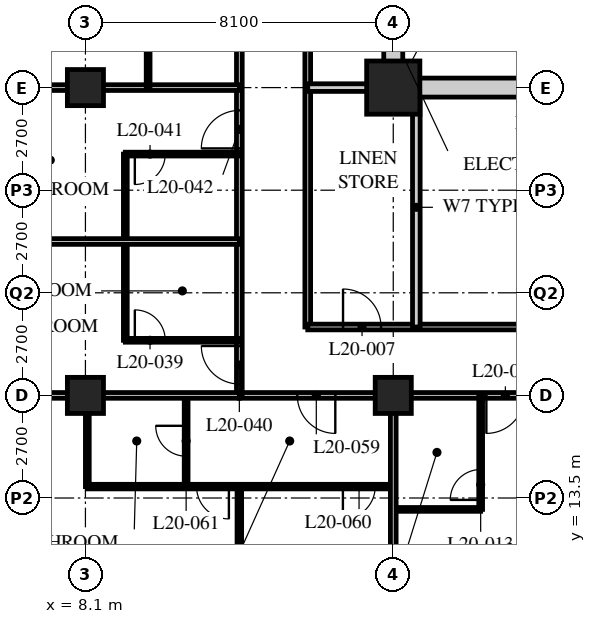
"""IFC4 building model, lengths in metres.
Left out: names, types, materials, properties, quantities, classifications, styles, units other than length and angle.
Written with IfcOpenShell. Run it as: python <this file> out.ifc"""

import sys

from ifc_helpers import new_model, si_unit, direction, frame, frame_2d, origin, origin_2d, place, context, subcontext, project, spatial, rectangle, hollow_rectangle, extrude, element, fill, save


model = new_model("IFC4")
c1 = context("Model", 3, precision=1e-05, world=origin(), true_north=direction((0.0, 1.0)))
c2 = subcontext(c1, "Body", "Model", "MODEL_VIEW")
j1 = project(units=[si_unit("LENGTHUNIT", "METRE"), si_unit("PLANEANGLEUNIT", "RADIAN")], contexts=[c1])
p1 = place(None, origin())
s1 = spatial("IfcSite", under=j1, at=p1, CompositionType="ELEMENT")
p2 = place(p1, origin())
s2 = spatial("IfcBuilding", under=s1, at=p2, CompositionType="ELEMENT")
p3 = place(p2, frame((0.0, 0.0, 80.6)))
s3 = spatial("IfcBuildingStorey", under=s2, at=p3, CompositionType="ELEMENT", Elevation=80.6)
for number, where, z_axis, x_axis in (
    (1, (8.1, 16.2, 0.0), (0.0, 0.0, 1.0), (1.0, 0.0, 0.0)),
    (2, (8.1, 24.3, 0.0), (0.0, 0.0, 1.0), (1.0, 0.0, 0.0)),
    (3, (16.2, 16.2, 0.0), (0.0, 0.0, 1.0), (1.0, 0.0, 0.0)),
):
    element("IfcColumn", number, at=place(p3, frame(where, z_axis=z_axis, x_axis=x_axis)), inside=s3, PredefinedType="COLUMN", context=c2, shape_type="SweptSolid", body=[
        extrude(hollow_rectangle(XDim=0.95, YDim=0.95, WallThickness=0.095, at=origin_2d()), origin(), (0.0, 0.0, 1.0), 3.4),
    ])
p4 = place(p3, frame((16.2, 24.3, 0.0), z_axis=(0.0, 0.0, 1.0), x_axis=(1.0, 0.0, 0.0)))
e4 = element("IfcColumn", 4, at=p4, inside=s3, PredefinedType="COLUMN", context=c2, shape_type="SweptSolid", body=[
    extrude(hollow_rectangle(XDim=1.4, YDim=1.4, WallThickness=0.12, at=origin_2d()), origin(), (0.0, 0.0, 1.0), 3.4),
])
p5 = place(p3, frame((12.15, 16.2, 0.0), z_axis=(0.0, 0.0, 1.0), x_axis=(1.0, 0.0, 0.0)))
e5 = element("IfcWall", 5, at=p5, inside=s3, PredefinedType="PARTITIONING", context=c2, shape_type="SweptSolid", body=[
    extrude(rectangle(XDim=36.45, YDim=0.15, at=frame_2d((18.225, 0.0))), origin(), (0.0, 0.0, 1.0), 2.428),
])
p6 = place(p5, frame((6.5, 0.0, 0.0)))
e6 = element("IfcOpeningElement", 6, at=p6, cuts=e5, PredefinedType="OPENING", context=c2, shape_type="SweptSolid", body=[
    extrude(rectangle(XDim=1.0, YDim=2.1, at=frame_2d((0.5, 1.05))), frame((0.0, 0.085, 0.0), z_axis=(0.0, -1.0, 0.0), x_axis=(1.0, 0.0, 0.0)), (0.0, 0.0, 1.0), 0.17),
])
p7 = place(p5, frame((8.4, 0.0, 0.0)))
e7 = element("IfcOpeningElement", 7, at=p7, cuts=e5, PredefinedType="OPENING", context=c2, shape_type="SweptSolid", body=[
    extrude(rectangle(XDim=1.0, YDim=2.1, at=frame_2d((0.5, 1.05))), frame((0.0, 0.085, 0.0), z_axis=(0.0, -1.0, 0.0), x_axis=(1.0, 0.0, 0.0)), (0.0, 0.0, 1.0), 0.17),
])
p8 = place(p5, frame((14.9, 0.0, 0.0)))
e8 = element("IfcOpeningElement", 8, at=p8, cuts=e5, PredefinedType="OPENING", context=c2, shape_type="SweptSolid", body=[
    extrude(rectangle(XDim=1.0, YDim=2.1, at=frame_2d((0.5, 1.05))), frame((0.0, 0.085, 0.0), z_axis=(0.0, -1.0, 0.0), x_axis=(1.0, 0.0, 0.0)), (0.0, 0.0, 1.0), 0.17),
])
p9 = place(p5, frame((16.5, 0.0, 0.0)))
e9 = element("IfcOpeningElement", 9, at=p9, cuts=e5, PredefinedType="OPENING", context=c2, shape_type="SweptSolid", body=[
    extrude(rectangle(XDim=1.0, YDim=2.1, at=frame_2d((0.5, 1.05))), frame((0.0, 0.085, 0.0), z_axis=(0.0, -1.0, 0.0), x_axis=(1.0, 0.0, 0.0)), (0.0, 0.0, 1.0), 0.17),
])
p10 = place(p5, frame((22.7, 0.0, 0.0)))
e10 = element("IfcOpeningElement", 10, at=p10, cuts=e5, PredefinedType="OPENING", context=c2, shape_type="SweptSolid", body=[
    extrude(rectangle(XDim=1.0, YDim=2.1, at=frame_2d((0.5, 1.05))), frame((0.0, 0.085, 0.0), z_axis=(0.0, -1.0, 0.0), x_axis=(1.0, 0.0, 0.0)), (0.0, 0.0, 1.0), 0.17),
])
p11 = place(p5, frame((24.9, 0.0, 0.0)))
e11 = element("IfcOpeningElement", 11, at=p11, cuts=e5, PredefinedType="OPENING", context=c2, shape_type="SweptSolid", body=[
    extrude(rectangle(XDim=1.0, YDim=2.1, at=frame_2d((0.5, 1.05))), frame((0.0, 0.085, 0.0), z_axis=(0.0, -1.0, 0.0), x_axis=(1.0, 0.0, 0.0)), (0.0, 0.0, 1.0), 0.17),
])
p12 = place(p5, frame((30.8, 0.0, 0.0)))
e12 = element("IfcOpeningElement", 12, at=p12, cuts=e5, PredefinedType="OPENING", context=c2, shape_type="SweptSolid", body=[
    extrude(rectangle(XDim=1.0, YDim=2.1, at=frame_2d((0.5, 1.05))), frame((0.0, 0.085, 0.0), z_axis=(0.0, -1.0, 0.0), x_axis=(1.0, 0.0, 0.0)), (0.0, 0.0, 1.0), 0.17),
])
p13 = place(p5, frame((1.525, 0.0, 0.0)))
e13 = element("IfcOpeningElement", 13, at=p13, cuts=e5, PredefinedType="OPENING", context=c2, shape_type="SweptSolid", body=[
    extrude(rectangle(XDim=1.0, YDim=2.1, at=frame_2d((0.5, 1.05))), frame((0.0, 0.085, 0.0), z_axis=(0.0, -1.0, 0.0), x_axis=(1.0, 0.0, 0.0)), (0.0, 0.0, 1.0), 0.17),
])
p14 = place(p5, frame((33.925, 0.0, 0.0)))
e14 = element("IfcOpeningElement", 14, at=p14, cuts=e5, PredefinedType="OPENING", context=c2, shape_type="SweptSolid", body=[
    extrude(rectangle(XDim=1.0, YDim=2.1, at=frame_2d((0.5, 1.05))), frame((0.0, 0.085, 0.0), z_axis=(0.0, -1.0, 0.0), x_axis=(1.0, 0.0, 0.0)), (0.0, 0.0, 1.0), 0.17),
])
p15 = place(p3, frame((12.15, 16.2, 0.0), z_axis=(0.0, 0.0, 1.0), x_axis=(0.0, 1.0, 0.0)))
e15 = element("IfcWall", 15, at=p15, inside=s3, PredefinedType="PARTITIONING", context=c2, shape_type="SweptSolid", body=[
    extrude(rectangle(XDim=26.1, YDim=0.15, at=frame_2d((13.05, 0.0))), origin(), (0.0, 0.0, 1.0), 3.19),
])
p16 = place(p15, frame((0.3, 0.0, 0.0)))
e16 = element("IfcOpeningElement", 16, at=p16, cuts=e15, PredefinedType="OPENING", context=c2, shape_type="SweptSolid", body=[
    extrude(rectangle(XDim=1.0, YDim=2.1, at=frame_2d((0.5, 1.05))), frame((0.0, 0.085, 0.0), z_axis=(0.0, -1.0, 0.0), x_axis=(1.0, 0.0, 0.0)), (0.0, 0.0, 1.0), 0.17),
])
p17 = place(p15, frame((6.5, 0.0, 0.0)))
e17 = element("IfcOpeningElement", 17, at=p17, cuts=e15, PredefinedType="OPENING", context=c2, shape_type="SweptSolid", body=[
    extrude(rectangle(XDim=1.0, YDim=2.1, at=frame_2d((0.5, 1.05))), frame((0.0, 0.085, 0.0), z_axis=(0.0, -1.0, 0.0), x_axis=(1.0, 0.0, 0.0)), (0.0, 0.0, 1.0), 0.17),
])
p18 = place(p15, frame((13.55, 0.0, 0.0)))
e18 = element("IfcOpeningElement", 18, at=p18, cuts=e15, PredefinedType="OPENING", context=c2, shape_type="SweptSolid", body=[
    extrude(rectangle(XDim=1.0, YDim=2.1, at=frame_2d((0.5, 1.05))), frame((0.0, 0.085, 0.0), z_axis=(0.0, -1.0, 0.0), x_axis=(1.0, 0.0, 0.0)), (0.0, 0.0, 1.0), 0.17),
])
p19 = place(p15, frame((21.65, 0.0, 0.0)))
e19 = element("IfcOpeningElement", 19, at=p19, cuts=e15, PredefinedType="OPENING", context=c2, shape_type="SweptSolid", body=[
    extrude(rectangle(XDim=1.0, YDim=2.1, at=frame_2d((0.5, 1.05))), frame((0.0, 0.085, 0.0), z_axis=(0.0, -1.0, 0.0), x_axis=(1.0, 0.0, 0.0)), (0.0, 0.0, 1.0), 0.17),
])
p20 = place(p3, frame((13.95, 40.5, 0.0), z_axis=(0.0, 0.0, 1.0), x_axis=(0.0, -1.0, 0.0)))
e20 = element("IfcWall", 20, at=p20, inside=s3, PredefinedType="PARTITIONING", context=c2, shape_type="SweptSolid", body=[
    extrude(rectangle(XDim=22.5, YDim=0.15, at=frame_2d((11.25, 0.0))), origin(), (0.0, 0.0, 1.0), 3.19),
])
p21 = place(p20, frame((11.65, 0.0, 0.0)))
e21 = element("IfcOpeningElement", 21, at=p21, cuts=e20, PredefinedType="OPENING", context=c2, shape_type="SweptSolid", body=[
    extrude(rectangle(XDim=1.0, YDim=2.1, at=frame_2d((0.5, 1.05))), frame((0.0, 0.085, 0.0), z_axis=(0.0, -1.0, 0.0), x_axis=(1.0, 0.0, 0.0)), (0.0, 0.0, 1.0), 0.17),
])
p22 = place(p20, frame((3.55, 0.0, 0.0)))
e22 = element("IfcOpeningElement", 22, at=p22, cuts=e20, PredefinedType="OPENING", context=c2, shape_type="SweptSolid", body=[
    extrude(rectangle(XDim=1.0, YDim=2.1, at=frame_2d((0.5, 1.05))), frame((0.0, 0.085, 0.0), z_axis=(0.0, -1.0, 0.0), x_axis=(1.0, 0.0, 0.0)), (0.0, 0.0, 1.0), 0.17),
])
p23 = place(p3, frame((13.95, 18.0, 0.0), z_axis=(0.0, 0.0, 1.0), x_axis=(1.0, 0.0, 0.0)))
e23 = element("IfcWall", 23, at=p23, inside=s3, PredefinedType="PARTITIONING", context=c2, shape_type="SweptSolid", body=[
    extrude(rectangle(XDim=13.19, YDim=0.15, at=frame_2d((6.595, 0.0))), origin(), (0.0, 0.0, 1.0), 3.19),
])
p24 = place(p23, frame((0.929, 0.0, 0.0)))
e24 = element("IfcOpeningElement", 24, at=p24, cuts=e23, PredefinedType="OPENING", context=c2, shape_type="SweptSolid", body=[
    extrude(rectangle(XDim=1.0, YDim=2.1, at=frame_2d((0.5, 1.05))), frame((0.0, 0.085, 0.0), z_axis=(0.0, -1.0, 0.0), x_axis=(1.0, 0.0, 0.0)), (0.0, 0.0, 1.0), 0.17),
])
p25 = place(p23, frame((7.529, 0.0, 0.0)))
e25 = element("IfcOpeningElement", 25, at=p25, cuts=e23, PredefinedType="OPENING", context=c2, shape_type="SweptSolid", body=[
    extrude(rectangle(XDim=1.0, YDim=2.1, at=frame_2d((0.5, 1.05))), frame((0.0, 0.085, 0.0), z_axis=(0.0, -1.0, 0.0), x_axis=(1.0, 0.0, 0.0)), (0.0, 0.0, 1.0), 0.17),
])
p26 = place(p3, frame((16.807, 18.0, 0.0), z_axis=(0.0, 0.0, 1.0), x_axis=(0.0, 1.0, 0.0)))
e26 = element("IfcWall", 26, at=p26, inside=s3, PredefinedType="SOLIDWALL", context=c2, shape_type="SweptSolid", body=[
    extrude(rectangle(XDim=6.3, YDim=0.2, at=frame_2d((3.15, 0.0))), origin(), (0.0, 0.0, 1.0), 3.19),
])
p27 = place(p3, frame((13.95, 24.3, 0.0), z_axis=(0.0, 0.0, 1.0), x_axis=(1.0, 0.0, 0.0)))
e27 = element("IfcWall", 27, at=p27, inside=s3, PredefinedType="SOLIDWALL", context=c2, shape_type="SweptSolid", body=[
    extrude(rectangle(XDim=2.25, YDim=0.2, at=frame_2d((1.125, 0.0))), origin(), (0.0, 0.0, 1.0), 2.428),
])
p28 = place(p3, frame((16.2, 13.2, 0.0), z_axis=(0.0, 0.0, 1.0), x_axis=(1.0, 0.0, 0.0)))
e28 = element("IfcWall", 28, at=p28, inside=s3, PredefinedType="PARTITIONING", context=c2, shape_type="SweptSolid", body=[
    extrude(rectangle(XDim=2.3, YDim=0.1, at=frame_2d((1.15, 0.0))), origin(), (0.0, 0.0, 1.0), 3.19),
])
p29 = place(p3, frame((18.5, 16.2, 0.0), z_axis=(0.0, 0.0, 1.0), x_axis=(0.0, -1.0, 0.0)))
e29 = element("IfcWall", 29, at=p29, inside=s3, PredefinedType="PARTITIONING", context=c2, shape_type="SweptSolid", body=[
    extrude(rectangle(XDim=3.0, YDim=0.1, at=frame_2d((1.5, 0.0))), origin(), (0.0, 0.0, 1.0), 3.19),
])
p30 = place(p29, frame((1.95, 0.0, 0.0)))
e30 = element("IfcOpeningElement", 30, at=p30, cuts=e29, PredefinedType="OPENING", context=c2, shape_type="SweptSolid", body=[
    extrude(rectangle(XDim=0.8, YDim=2.1, at=frame_2d((0.4, 1.05))), frame((0.0, 0.06, 0.0), z_axis=(0.0, -1.0, 0.0), x_axis=(1.0, 0.0, 0.0)), (0.0, 0.0, 1.0), 0.12),
])
p31 = place(p3, frame((9.15, 17.65, 0.0), z_axis=(0.0, 0.0, 1.0), x_axis=(0.0, 1.0, 0.0)))
e31 = element("IfcWall", 31, at=p31, inside=s3, PredefinedType="PARTITIONING", context=c2, shape_type="SweptSolid", body=[
    extrude(rectangle(XDim=4.9, YDim=0.1, at=frame_2d((2.45, 0.0))), origin(), (0.0, 0.0, 1.0), 3.19),
])
p32 = place(p3, frame((12.15, 17.65, 0.0), z_axis=(0.0, 0.0, 1.0), x_axis=(-1.0, 0.0, 0.0)))
e32 = element("IfcWall", 32, at=p32, inside=s3, PredefinedType="PARTITIONING", context=c2, shape_type="SweptSolid", body=[
    extrude(rectangle(XDim=3.0, YDim=0.1, at=frame_2d((1.5, 0.0))), origin(), (0.0, 0.0, 1.0), 3.19),
])
p33 = place(p32, frame((1.95, 0.0, 0.0)))
e33 = element("IfcOpeningElement", 33, at=p33, cuts=e32, PredefinedType="OPENING", context=c2, shape_type="SweptSolid", body=[
    extrude(rectangle(XDim=0.8, YDim=2.1, at=frame_2d((0.4, 1.05))), frame((0.0, 0.06, 0.0), z_axis=(0.0, -1.0, 0.0), x_axis=(1.0, 0.0, 0.0)), (0.0, 0.0, 1.0), 0.12),
])
p34 = place(p3, frame((12.15, 20.25, 0.0), z_axis=(0.0, 0.0, 1.0), x_axis=(-1.0, 0.0, 0.0)))
e34 = element("IfcWall", 34, at=p34, inside=s3, PredefinedType="PARTITIONING", context=c2, shape_type="SweptSolid", body=[
    extrude(rectangle(XDim=11.85, YDim=0.15, at=frame_2d((5.925, 0.0))), origin(), (0.0, 0.0, 1.0), 3.19),
])
p35 = place(p3, frame((12.15, 22.55, 0.0), z_axis=(0.0, 0.0, 1.0), x_axis=(-1.0, 0.0, 0.0)))
e35 = element("IfcWall", 35, at=p35, inside=s3, PredefinedType="PARTITIONING", context=c2, shape_type="SweptSolid", body=[
    extrude(rectangle(XDim=3.0, YDim=0.1, at=frame_2d((1.5, 0.0))), origin(), (0.0, 0.0, 1.0), 3.19),
])
p36 = place(p35, frame((1.95, 0.0, 0.0)))
e36 = element("IfcOpeningElement", 36, at=p36, cuts=e35, PredefinedType="OPENING", context=c2, shape_type="SweptSolid", body=[
    extrude(rectangle(XDim=0.8, YDim=2.1, at=frame_2d((0.4, 1.05))), frame((0.0, 0.06, 0.0), z_axis=(0.0, -1.0, 0.0), x_axis=(1.0, 0.0, 0.0)), (0.0, 0.0, 1.0), 0.12),
])
p37 = place(p3, frame((12.15, 24.3, 0.0), z_axis=(0.0, 0.0, 1.0), x_axis=(-1.0, 0.0, 0.0)))
e37 = element("IfcWall", 37, at=p37, inside=s3, PredefinedType="PARTITIONING", context=c2, shape_type="SweptSolid", body=[
    extrude(rectangle(XDim=11.85, YDim=0.15, at=frame_2d((5.925, 0.0))), origin(), (0.0, 0.0, 1.0), 2.428),
])
p38 = place(p3, frame((9.75, 24.3, 0.0), z_axis=(0.0, 0.0, 1.0), x_axis=(0.0, 1.0, 0.0)))
e38 = element("IfcWall", 38, at=p38, inside=s3, PredefinedType="PARTITIONING", context=c2, shape_type="SweptSolid", body=[
    extrude(rectangle(XDim=5.2, YDim=0.1, at=frame_2d((2.6, 0.0))), origin(), (0.0, 0.0, 1.0), 3.19),
])
p39 = place(p38, frame((1.3, 0.0, 0.0)))
e39 = element("IfcOpeningElement", 39, at=p39, cuts=e38, PredefinedType="OPENING", context=c2, shape_type="SweptSolid", body=[
    extrude(rectangle(XDim=0.8, YDim=2.1, at=frame_2d((0.4, 1.05))), frame((0.0, 0.06, 0.0), z_axis=(0.0, -1.0, 0.0), x_axis=(1.0, 0.0, 0.0)), (0.0, 0.0, 1.0), 0.12),
])
p40 = place(p38, frame((3.9, 0.0, 0.0)))
e40 = element("IfcOpeningElement", 40, at=p40, cuts=e38, PredefinedType="OPENING", context=c2, shape_type="SweptSolid", body=[
    extrude(rectangle(XDim=0.8, YDim=2.1, at=frame_2d((0.4, 1.05))), frame((0.0, 0.06, 0.0), z_axis=(0.0, -1.0, 0.0), x_axis=(1.0, 0.0, 0.0)), (0.0, 0.0, 1.0), 0.12),
])
p41 = place(p3, frame((10.75, 16.2, 0.0), z_axis=(0.0, 0.0, 1.0), x_axis=(0.0, -1.0, 0.0)))
e41 = element("IfcWall", 41, at=p41, inside=s3, PredefinedType="PARTITIONING", context=c2, shape_type="SweptSolid", body=[
    extrude(rectangle(XDim=2.4, YDim=0.1, at=frame_2d((1.2, 0.0))), origin(), (0.0, 0.0, 1.0), 3.19),
])
p42 = place(p41, frame((0.8, 0.0, 0.0)))
e42 = element("IfcOpeningElement", 42, at=p42, cuts=e41, PredefinedType="OPENING", context=c2, shape_type="SweptSolid", body=[
    extrude(rectangle(XDim=0.8, YDim=2.1, at=frame_2d((0.4, 1.05))), frame((0.0, 0.06, 0.0), z_axis=(0.0, -1.0, 0.0), x_axis=(1.0, 0.0, 0.0)), (0.0, 0.0, 1.0), 0.12),
])
p43 = place(p3, frame((8.15, 16.2, 0.0), z_axis=(0.0, 0.0, 1.0), x_axis=(0.0, -1.0, 0.0)))
e43 = element("IfcWall", 43, at=p43, inside=s3, PredefinedType="PARTITIONING", context=c2, shape_type="SweptSolid", body=[
    extrude(rectangle(XDim=2.4, YDim=0.1, at=frame_2d((1.2, 0.0))), origin(), (0.0, 0.0, 1.0), 2.428),
])
p44 = place(p3, frame((8.15, 13.8, 0.0), z_axis=(0.0, 0.0, 1.0), x_axis=(1.0, 0.0, 0.0)))
e44 = element("IfcWall", 44, at=p44, inside=s3, PredefinedType="PARTITIONING", context=c2, shape_type="SweptSolid", body=[
    extrude(rectangle(XDim=8.05, YDim=0.12, at=frame_2d((4.025, 0.0))), origin(), (0.0, 0.0, 1.0), 3.19),
])
p45 = place(p44, frame((6.725, 0.0, 0.0)))
e45 = element("IfcOpeningElement", 45, at=p45, cuts=e44, PredefinedType="OPENING", context=c2, shape_type="SweptSolid", body=[
    extrude(rectangle(XDim=0.85, YDim=2.1, at=frame_2d((0.425, 1.05))), frame((0.0, 0.07, 0.0), z_axis=(0.0, -1.0, 0.0), x_axis=(1.0, 0.0, 0.0)), (0.0, 0.0, 1.0), 0.14),
])
p46 = place(p44, frame((2.875, 0.0, 0.0)))
e46 = element("IfcOpeningElement", 46, at=p46, cuts=e44, PredefinedType="OPENING", context=c2, shape_type="SweptSolid", body=[
    extrude(rectangle(XDim=0.85, YDim=2.1, at=frame_2d((0.425, 1.05))), frame((0.0, 0.07, 0.0), z_axis=(0.0, -1.0, 0.0), x_axis=(1.0, 0.0, 0.0)), (0.0, 0.0, 1.0), 0.14),
])
p47 = place(p3, frame((12.15, 13.8, 0.0), z_axis=(0.0, 0.0, 1.0), x_axis=(0.0, -1.0, 0.0)))
e47 = element("IfcWall", 47, at=p47, inside=s3, PredefinedType="PARTITIONING", context=c2, shape_type="SweptSolid", body=[
    extrude(rectangle(XDim=13.5, YDim=0.12, at=frame_2d((6.75, 0.0))), origin(), (0.0, 0.0, 1.0), 3.19),
])
p48 = place(p3, frame((0.3, 16.2, 0.0), z_axis=(0.0, 0.0, 1.0), x_axis=(1.0, 0.0, 0.0)))
e48 = element("IfcWall", 48, at=p48, inside=s3, PredefinedType="PARTITIONING", context=c2, shape_type="SweptSolid", body=[
    extrude(rectangle(XDim=11.85, YDim=0.15, at=frame_2d((5.925, 0.0))), origin(), (0.0, 0.0, 1.0), 2.428),
])
p49 = place(p3, frame((16.2, 16.2, 0.0), z_axis=(0.0, 0.0, 1.0), x_axis=(0.0, -1.0, 0.0)))
e49 = element("IfcWall", 49, at=p49, inside=s3, PredefinedType="PARTITIONING", context=c2, shape_type="SweptSolid", body=[
    extrude(rectangle(XDim=15.9, YDim=0.15, at=frame_2d((7.95, 0.0))), origin(), (0.0, 0.0, 1.0), 2.428),
])
p50 = place(p3, frame((15.95, 24.3, 0.0), z_axis=(0.0, 0.0, 1.0), x_axis=(1.0, 0.0, 0.0)))
e50 = element("IfcWall", 50, at=p50, inside=s3, PredefinedType="SOLIDWALL", context=c2, shape_type="SweptSolid", body=[
    extrude(rectangle(XDim=24.8, YDim=0.5, at=frame_2d((12.4, 0.0))), origin(), (0.0, 0.0, 1.0), 2.428),
])
p51 = place(p50, frame((11.5, 0.0, 0.0)))
e51 = element("IfcOpeningElement", 51, at=p51, cuts=e50, PredefinedType="OPENING", context=c2, shape_type="SweptSolid", body=[
    extrude(rectangle(XDim=1.8, YDim=2.4, at=frame_2d((0.9, 1.2))), frame((0.0, 0.26, 0.0), z_axis=(0.0, -1.0, 0.0), x_axis=(1.0, 0.0, 0.0)), (0.0, 0.0, 1.0), 0.52),
])
p52 = place(p3, frame((16.2, 24.55, 0.0), z_axis=(0.0, 0.0, 1.0), x_axis=(0.0, 1.0, 0.0)))
e52 = element("IfcWall", 52, at=p52, inside=s3, PredefinedType="SOLIDWALL", context=c2, shape_type="SweptSolid", body=[
    extrude(rectangle(XDim=15.7, YDim=0.5, at=frame_2d((7.85, 0.0))), origin(), (0.0, 0.0, 1.0), 2.428),
])
p53 = place(p24, origin())
e53 = element("IfcDoor", 53, at=p53, inside=s3, OperationType="SINGLE_SWING_LEFT", PredefinedType="DOOR", context=c2, shape_type="SweptSolid", body=[
    extrude(rectangle(XDim=1.0, YDim=2.1, at=frame_2d((0.5, 1.05))), frame((0.0, 0.025, 0.0), z_axis=(0.0, -1.0, 0.0), x_axis=(1.0, 0.0, 0.0)), (0.0, 0.0, 1.0), 0.05),
])
fill(e24, e53)
p54 = place(p30, origin())
e54 = element("IfcDoor", 54, at=p54, inside=s3, OperationType="SINGLE_SWING_LEFT", PredefinedType="DOOR", context=c2, shape_type="SweptSolid", body=[
    extrude(rectangle(XDim=0.8, YDim=2.1, at=frame_2d((0.4, 1.05))), frame((0.0, 0.025, 0.0), z_axis=(0.0, -1.0, 0.0), x_axis=(1.0, 0.0, 0.0)), (0.0, 0.0, 1.0), 0.05),
])
fill(e30, e54)
p55 = place(p6, origin())
e55 = element("IfcDoor", 55, at=p55, inside=s3, OperationType="SINGLE_SWING_RIGHT", PredefinedType="DOOR", context=c2, shape_type="SweptSolid", body=[
    extrude(rectangle(XDim=1.0, YDim=2.1, at=frame_2d((0.5, 1.05))), frame((0.0, 0.025, 0.0), z_axis=(0.0, -1.0, 0.0), x_axis=(1.0, 0.0, 0.0)), (0.0, 0.0, 1.0), 0.05),
])
fill(e6, e55)
p56 = place(p33, origin())
e56 = element("IfcDoor", 56, at=p56, inside=s3, OperationType="SINGLE_SWING_LEFT", PredefinedType="DOOR", context=c2, shape_type="SweptSolid", body=[
    extrude(rectangle(XDim=0.8, YDim=2.1, at=frame_2d((0.4, 1.05))), frame((0.0, 0.025, 0.0), z_axis=(0.0, -1.0, 0.0), x_axis=(1.0, 0.0, 0.0)), (0.0, 0.0, 1.0), 0.05),
])
fill(e33, e56)
p57 = place(p16, origin())
e57 = element("IfcDoor", 57, at=p57, inside=s3, OperationType="SINGLE_SWING_RIGHT", PredefinedType="DOOR", context=c2, shape_type="SweptSolid", body=[
    extrude(rectangle(XDim=1.0, YDim=2.1, at=frame_2d((0.5, 1.05))), frame((0.0, 0.025, 0.0), z_axis=(0.0, -1.0, 0.0), x_axis=(1.0, 0.0, 0.0)), (0.0, 0.0, 1.0), 0.05),
])
fill(e16, e57)
p58 = place(p36, origin())
e58 = element("IfcDoor", 58, at=p58, inside=s3, OperationType="SINGLE_SWING_RIGHT", PredefinedType="DOOR", context=c2, shape_type="SweptSolid", body=[
    extrude(rectangle(XDim=0.8, YDim=2.1, at=frame_2d((0.4, 1.05))), frame((0.0, 0.025, 0.0), z_axis=(0.0, -1.0, 0.0), x_axis=(1.0, 0.0, 0.0)), (0.0, 0.0, 1.0), 0.05),
])
fill(e36, e58)
p59 = place(p17, origin())
e59 = element("IfcDoor", 59, at=p59, inside=s3, OperationType="SINGLE_SWING_LEFT", PredefinedType="DOOR", context=c2, shape_type="SweptSolid", body=[
    extrude(rectangle(XDim=1.0, YDim=2.1, at=frame_2d((0.5, 1.05))), frame((0.0, 0.025, 0.0), z_axis=(0.0, -1.0, 0.0), x_axis=(1.0, 0.0, 0.0)), (0.0, 0.0, 1.0), 0.05),
])
fill(e17, e59)
p60 = place(p13, origin())
e60 = element("IfcDoor", 60, at=p60, inside=s3, OperationType="SINGLE_SWING_LEFT", PredefinedType="DOOR", context=c2, shape_type="SweptSolid", body=[
    extrude(rectangle(XDim=1.0, YDim=2.1, at=frame_2d((0.5, 1.05))), frame((0.0, 0.025, 0.0), z_axis=(0.0, -1.0, 0.0), x_axis=(1.0, 0.0, 0.0)), (0.0, 0.0, 1.0), 0.05),
])
fill(e13, e60)
p61 = place(p45, origin())
e61 = element("IfcDoor", 61, at=p61, inside=s3, OperationType="SINGLE_SWING_RIGHT", PredefinedType="DOOR", context=c2, shape_type="SweptSolid", body=[
    extrude(rectangle(XDim=0.85, YDim=2.1, at=frame_2d((0.425, 1.05))), frame((0.0, 0.025, 0.0), z_axis=(0.0, -1.0, 0.0), x_axis=(1.0, 0.0, 0.0)), (0.0, 0.0, 1.0), 0.05),
])
fill(e45, e61)
p62 = place(p42, origin())
e62 = element("IfcDoor", 62, at=p62, inside=s3, OperationType="SINGLE_SWING_RIGHT", PredefinedType="DOOR", context=c2, shape_type="SweptSolid", body=[
    extrude(rectangle(XDim=0.8, YDim=2.1, at=frame_2d((0.4, 1.05))), frame((0.0, 0.025, 0.0), z_axis=(0.0, -1.0, 0.0), x_axis=(1.0, 0.0, 0.0)), (0.0, 0.0, 1.0), 0.05),
])
fill(e42, e62)
p63 = place(p46, origin())
e63 = element("IfcDoor", 63, at=p63, inside=s3, OperationType="SINGLE_SWING_LEFT", PredefinedType="DOOR", context=c2, shape_type="SweptSolid", body=[
    extrude(rectangle(XDim=0.85, YDim=2.1, at=frame_2d((0.425, 1.05))), frame((0.0, 0.025, 0.0), z_axis=(0.0, -1.0, 0.0), x_axis=(1.0, 0.0, 0.0)), (0.0, 0.0, 1.0), 0.05),
])
fill(e46, e63)
save(model, sys.argv[1])
